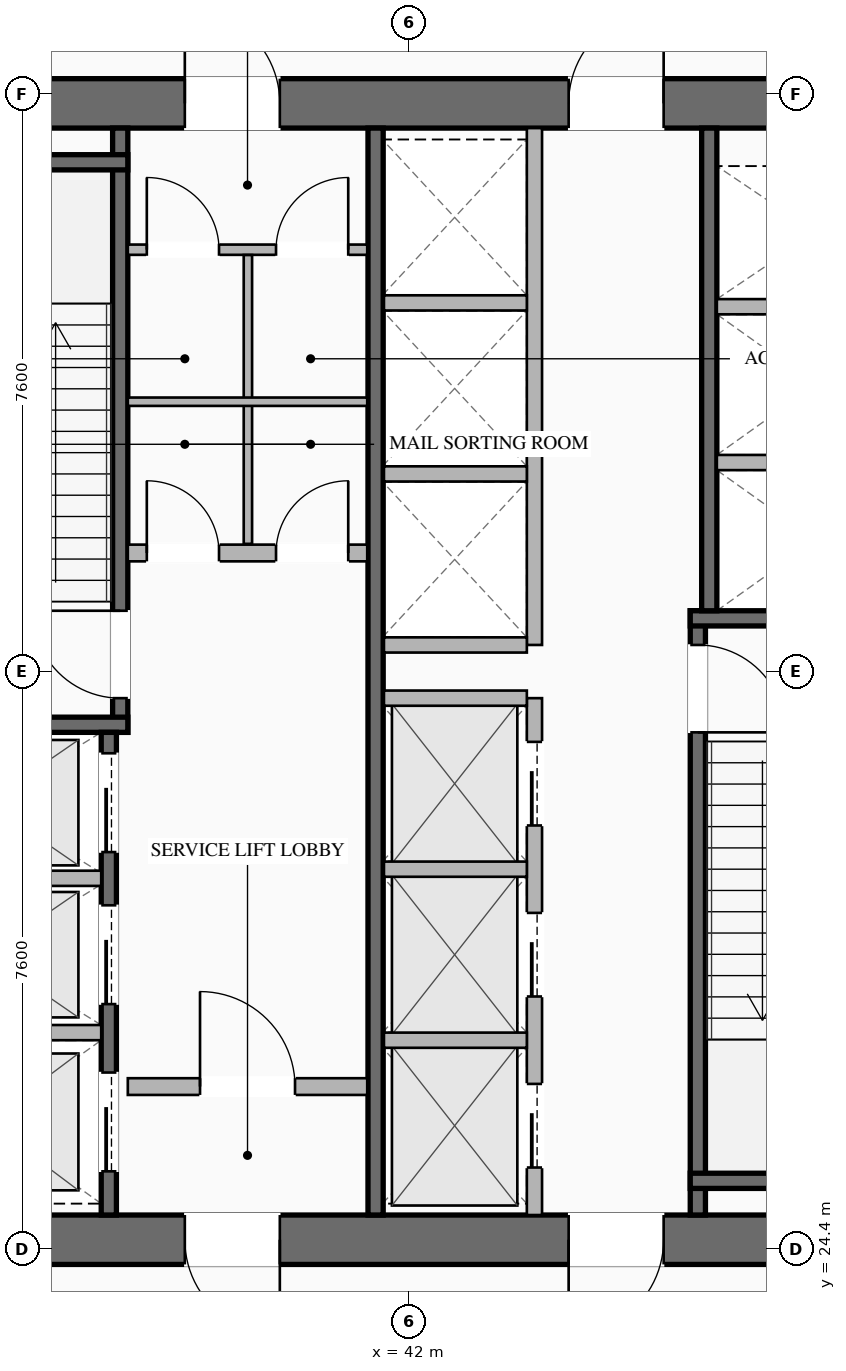
"""IFC4 building model, lengths in metres.
Left out: names, types, materials, properties, quantities, classifications, styles, units other than length and angle.
Written with IfcOpenShell. Run it as: python <this file> out.ifc"""

import sys

from ifc_helpers import new_model, si_unit, direction, frame, frame_2d, origin, place, context, subcontext, project, spatial, rectangle, extrude, element, fill, save


model = new_model("IFC4")
c1 = context("Model", 3, precision=1e-05, world=origin(), true_north=direction((0.0, 1.0)))
c2 = subcontext(c1, "Body", "Model", "MODEL_VIEW")
j1 = project(units=[si_unit("LENGTHUNIT", "METRE"), si_unit("PLANEANGLEUNIT", "RADIAN")], contexts=[c1])
p1 = place(None, origin())
s1 = spatial("IfcSite", under=j1, at=p1, CompositionType="ELEMENT")
p2 = place(p1, origin())
s2 = spatial("IfcBuilding", under=s1, at=p2, CompositionType="ELEMENT")
p3 = place(p2, frame((0.0, 0.0, -5.5)))
s3 = spatial("IfcBuildingStorey", under=s2, at=p3, CompositionType="ELEMENT", Elevation=-5.5)
p4 = place(p3, frame((49.15, 24.525, 0.0), z_axis=(0.0, 0.0, 1.0), x_axis=(-1.0, 0.0, 0.0)))
e1 = element("IfcWall", 1, at=p4, inside=s3, PredefinedType="SHEAR", context=c2, shape_type="SweptSolid", body=[
    extrude(rectangle(XDim=14.3, YDim=0.65, at=frame_2d((7.15, 0.0))), origin(), (0.0, 0.0, 1.0), 5.5),
])
p5 = place(p4, frame((8.85, 0.0, 0.0)))
e2 = element("IfcOpeningElement", 2, at=p5, cuts=e1, PredefinedType="OPENING", context=c2, shape_type="SweptSolid", body=[
    extrude(rectangle(XDim=1.25, YDim=2.25, at=frame_2d((0.625, 1.125))), frame((0.0, 0.335, 0.0), z_axis=(0.0, -1.0, 0.0), x_axis=(1.0, 0.0, 0.0)), (0.0, 0.0, 1.0), 0.67),
])
p6 = place(p4, frame((3.8, 0.0, 0.0)))
e3 = element("IfcOpeningElement", 3, at=p6, cuts=e1, PredefinedType="OPENING", context=c2, shape_type="SweptSolid", body=[
    extrude(rectangle(XDim=1.25, YDim=2.25, at=frame_2d((0.625, 1.125))), frame((0.0, 0.335, 0.0), z_axis=(0.0, -1.0, 0.0), x_axis=(1.0, 0.0, 0.0)), (0.0, 0.0, 1.0), 0.67),
])
p7 = place(p3, frame((34.85, 39.475, 0.0), z_axis=(0.0, 0.0, 1.0), x_axis=(1.0, 0.0, 0.0)))
e4 = element("IfcWall", 4, at=p7, inside=s3, PredefinedType="SHEAR", context=c2, shape_type="SweptSolid", body=[
    extrude(rectangle(XDim=14.3, YDim=0.65, at=frame_2d((7.15, 0.0))), origin(), (0.0, 0.0, 1.0), 5.5),
])
p8 = place(p7, frame((4.2, 0.0, 0.0)))
e5 = element("IfcOpeningElement", 5, at=p8, cuts=e4, PredefinedType="OPENING", context=c2, shape_type="SweptSolid", body=[
    extrude(rectangle(XDim=1.25, YDim=2.25, at=frame_2d((0.625, 1.125))), frame((0.0, 0.335, 0.0), z_axis=(0.0, -1.0, 0.0), x_axis=(1.0, 0.0, 0.0)), (0.0, 0.0, 1.0), 0.67),
])
p9 = place(p7, frame((9.25, 0.0, 0.0)))
e6 = element("IfcOpeningElement", 6, at=p9, cuts=e4, PredefinedType="OPENING", context=c2, shape_type="SweptSolid", body=[
    extrude(rectangle(XDim=1.25, YDim=2.25, at=frame_2d((0.625, 1.125))), frame((0.0, 0.335, 0.0), z_axis=(0.0, -1.0, 0.0), x_axis=(1.0, 0.0, 0.0)), (0.0, 0.0, 1.0), 0.67),
])
p10 = place(p3, frame((38.2, 31.2, 0.0), z_axis=(0.0, 0.0, 1.0), x_axis=(0.0, 1.0, 0.0)))
e7 = element("IfcWall", 7, at=p10, inside=s3, PredefinedType="SHEAR", context=c2, shape_type="SweptSolid", body=[
    extrude(rectangle(XDim=7.95, YDim=0.2, at=frame_2d((3.975, 0.0))), origin(), (0.0, 0.0, 1.0), 5.2),
])
p11 = place(p10, frame((0.45, 0.0, 0.0)))
e8 = element("IfcOpeningElement", 8, at=p11, cuts=e7, PredefinedType="OPENING", context=c2, shape_type="SweptSolid", body=[
    extrude(rectangle(XDim=1.15, YDim=2.2, at=frame_2d((0.575, 1.1))), frame((0.0, 0.11, 0.0), z_axis=(0.0, -1.0, 0.0), x_axis=(1.0, 0.0, 0.0)), (0.0, 0.0, 1.0), 0.22),
])
for number, where, z_axis, x_axis in (
    (9, (34.85, 31.3, 0.0), (0.0, 0.0, 1.0), (1.0, 0.0, 0.0)),
    (10, (34.85, 38.7, 0.0), (0.0, 0.0, 1.0), (1.0, 0.0, 0.0)),
):
    element("IfcWall", number, at=place(p3, frame(where, z_axis=z_axis, x_axis=x_axis)), inside=s3, PredefinedType="SHEAR", context=c2, shape_type="SweptSolid", body=[
        extrude(rectangle(XDim=3.45, YDim=0.2, at=frame_2d((1.725, 0.0))), origin(), (0.0, 0.0, 1.0), 5.2),
    ])
p12 = place(p3, frame((45.8, 32.8, 0.0), z_axis=(0.0, 0.0, 1.0), x_axis=(0.0, -1.0, 0.0)))
e11 = element("IfcWall", 11, at=p12, inside=s3, PredefinedType="SHEAR", context=c2, shape_type="SweptSolid", body=[
    extrude(rectangle(XDim=7.95, YDim=0.2, at=frame_2d((3.975, 0.0))), origin(), (0.0, 0.0, 1.0), 5.2),
])
p13 = place(p12, frame((0.45, 0.0, 0.0)))
e12 = element("IfcOpeningElement", 12, at=p13, cuts=e11, PredefinedType="OPENING", context=c2, shape_type="SweptSolid", body=[
    extrude(rectangle(XDim=1.15, YDim=2.2, at=frame_2d((0.575, 1.1))), frame((0.0, 0.11, 0.0), z_axis=(0.0, -1.0, 0.0), x_axis=(1.0, 0.0, 0.0)), (0.0, 0.0, 1.0), 0.22),
])
for number, where, z_axis, x_axis in (
    (13, (45.7, 32.7, 0.0), (0.0, 0.0, 1.0), (1.0, 0.0, 0.0)),
    (14, (45.7, 25.3, 0.0), (0.0, 0.0, 1.0), (1.0, 0.0, 0.0)),
):
    element("IfcWall", number, at=place(p3, frame(where, z_axis=z_axis, x_axis=x_axis)), inside=s3, PredefinedType="SHEAR", context=c2, shape_type="SweptSolid", body=[
        extrude(rectangle(XDim=3.45, YDim=0.2, at=frame_2d((1.725, 0.0))), origin(), (0.0, 0.0, 1.0), 5.2),
    ])
p14 = place(p3, frame((41.56, 24.85, 0.0), z_axis=(0.0, 0.0, 1.0), x_axis=(0.0, 1.0, 0.0)))
e15 = element("IfcWall", 15, at=p14, inside=s3, PredefinedType="SHEAR", context=c2, shape_type="SweptSolid", body=[
    extrude(rectangle(XDim=14.3, YDim=0.2, at=frame_2d((7.15, 0.0))), origin(), (0.0, 0.0, 1.0), 5.2),
])
p15 = place(p3, frame((38.3, 33.56, 0.0), z_axis=(0.0, 0.0, 1.0), x_axis=(1.0, 0.0, 0.0)))
e16 = element("IfcWall", 16, at=p15, inside=s3, PredefinedType="SOLIDWALL", context=c2, shape_type="SweptSolid", body=[
    extrude(rectangle(XDim=3.15, YDim=0.22, at=frame_2d((1.575, 0.0))), origin(), (0.0, 0.0, 1.0), 4.243),
])
p16 = place(p15, frame((0.25, 0.0, 0.0)))
e17 = element("IfcOpeningElement", 17, at=p16, cuts=e16, PredefinedType="OPENING", context=c2, shape_type="SweptSolid", body=[
    extrude(rectangle(XDim=0.95, YDim=2.05, at=frame_2d((0.475, 1.025))), frame((0.0, 0.12, 0.0), z_axis=(0.0, -1.0, 0.0), x_axis=(1.0, 0.0, 0.0)), (0.0, 0.0, 1.0), 0.24),
])
p17 = place(p15, frame((1.95, 0.0, 0.0)))
e18 = element("IfcOpeningElement", 18, at=p17, cuts=e16, PredefinedType="OPENING", context=c2, shape_type="SweptSolid", body=[
    extrude(rectangle(XDim=0.95, YDim=2.05, at=frame_2d((0.475, 1.025))), frame((0.0, 0.12, 0.0), z_axis=(0.0, -1.0, 0.0), x_axis=(1.0, 0.0, 0.0)), (0.0, 0.0, 1.0), 0.24),
])
p18 = place(p3, frame((38.3, 26.54, 0.0), z_axis=(0.0, 0.0, 1.0), x_axis=(1.0, 0.0, 0.0)))
e19 = element("IfcWall", 19, at=p18, inside=s3, PredefinedType="SOLIDWALL", context=c2, shape_type="SweptSolid", body=[
    extrude(rectangle(XDim=3.15, YDim=0.22, at=frame_2d((1.575, 0.0))), origin(), (0.0, 0.0, 1.0), 4.243),
])
p19 = place(p18, frame((0.95, 0.0, 0.0)))
e20 = element("IfcOpeningElement", 20, at=p19, cuts=e19, PredefinedType="OPENING", context=c2, shape_type="SweptSolid", body=[
    extrude(rectangle(XDim=1.25, YDim=2.25, at=frame_2d((0.625, 1.125))), frame((0.0, 0.12, 0.0), z_axis=(0.0, -1.0, 0.0), x_axis=(1.0, 0.0, 0.0)), (0.0, 0.0, 1.0), 0.24),
])
p20 = place(p3, frame((38.05, 24.85, 0.0), z_axis=(0.0, 0.0, 1.0), x_axis=(0.0, 1.0, 0.0)))
e21 = element("IfcWall", 21, at=p20, inside=s3, PredefinedType="SHEAR", context=c2, shape_type="SweptSolid", body=[
    extrude(rectangle(XDim=6.35, YDim=0.2, at=frame_2d((3.175, 0.0))), origin(), (0.0, 0.0, 1.0), 5.2),
])
p21 = place(p20, frame((4.775, 0.0, 0.0)))
e22 = element("IfcOpeningElement", 22, at=p21, cuts=e21, PredefinedType="OPENING", context=c2, shape_type="SweptSolid", body=[
    extrude(rectangle(XDim=1.3, YDim=2.25, at=frame_2d((0.65, 1.125))), frame((0.0, 0.11, 0.0), z_axis=(0.0, -1.0, 0.0), x_axis=(1.0, 0.0, 0.0)), (0.0, 0.0, 1.0), 0.22),
])
p22 = place(p20, frame((2.775, 0.0, 0.0)))
e23 = element("IfcOpeningElement", 23, at=p22, cuts=e21, PredefinedType="OPENING", context=c2, shape_type="SweptSolid", body=[
    extrude(rectangle(XDim=1.3, YDim=2.25, at=frame_2d((0.65, 1.125))), frame((0.0, 0.11, 0.0), z_axis=(0.0, -1.0, 0.0), x_axis=(1.0, 0.0, 0.0)), (0.0, 0.0, 1.0), 0.22),
])
p23 = place(p20, frame((0.575, 0.0, 0.0)))
e24 = element("IfcOpeningElement", 24, at=p23, cuts=e21, PredefinedType="OPENING", context=c2, shape_type="SweptSolid", body=[
    extrude(rectangle(XDim=1.3, YDim=2.25, at=frame_2d((0.65, 1.125))), frame((0.0, 0.11, 0.0), z_axis=(0.0, -1.0, 0.0), x_axis=(1.0, 0.0, 0.0)), (0.0, 0.0, 1.0), 0.22),
])
for number, where, z_axis, x_axis in (
    (25, (34.85, 27.25, 0.0), (0.0, 0.0, 1.0), (1.0, 0.0, 0.0)),
    (26, (34.85, 29.28, 0.0), (0.0, 0.0, 1.0), (1.0, 0.0, 0.0)),
):
    element("IfcWall", number, at=place(p3, frame(where, z_axis=z_axis, x_axis=x_axis)), inside=s3, PredefinedType="SOLIDWALL", context=c2, shape_type="SweptSolid", body=[
        extrude(rectangle(XDim=3.1, YDim=0.2, at=frame_2d((1.55, 0.0))), origin(), (0.0, 0.0, 1.0), 5.2),
    ])
p24 = place(p3, frame((45.95, 39.15, 0.0), z_axis=(0.0, 0.0, 1.0), x_axis=(0.0, -1.0, 0.0)))
e27 = element("IfcWall", 27, at=p24, inside=s3, PredefinedType="SHEAR", context=c2, shape_type="SweptSolid", body=[
    extrude(rectangle(XDim=6.35, YDim=0.2, at=frame_2d((3.175, 0.0))), origin(), (0.0, 0.0, 1.0), 5.2),
])
for number, where, z_axis, x_axis in (
    (28, (46.05, 34.75, 0.0), (0.0, 0.0, 1.0), (1.0, 0.0, 0.0)),
    (29, (46.05, 36.8, 0.0), (0.0, 0.0, 1.0), (1.0, 0.0, 0.0)),
):
    element("IfcWall", number, at=place(p3, frame(where, z_axis=z_axis, x_axis=x_axis)), inside=s3, PredefinedType="SOLIDWALL", context=c2, shape_type="SweptSolid", body=[
        extrude(rectangle(XDim=3.1, YDim=0.2, at=frame_2d((1.55, 0.0))), origin(), (0.0, 0.0, 1.0), 5.2),
    ])
p25 = place(p3, frame((38.3, 37.55, 0.0), z_axis=(0.0, 0.0, 1.0), x_axis=(1.0, 0.0, 0.0)))
e30 = element("IfcWall", 30, at=p25, inside=s3, PredefinedType="PARTITIONING", context=c2, shape_type="SweptSolid", body=[
    extrude(rectangle(XDim=3.15, YDim=0.135, at=frame_2d((1.575, 0.0))), origin(), (0.0, 0.0, 1.0), 4.243),
])
p26 = place(p25, frame((0.25, 0.0, 0.0)))
e31 = element("IfcOpeningElement", 31, at=p26, cuts=e30, PredefinedType="OPENING", context=c2, shape_type="SweptSolid", body=[
    extrude(rectangle(XDim=0.95, YDim=2.05, at=frame_2d((0.475, 1.025))), frame((0.0, 0.077, 0.0), z_axis=(0.0, -1.0, 0.0), x_axis=(1.0, 0.0, 0.0)), (0.0, 0.0, 1.0), 0.155),
])
p27 = place(p25, frame((1.95, 0.0, 0.0)))
e32 = element("IfcOpeningElement", 32, at=p27, cuts=e30, PredefinedType="OPENING", context=c2, shape_type="SweptSolid", body=[
    extrude(rectangle(XDim=0.95, YDim=2.05, at=frame_2d((0.475, 1.025))), frame((0.0, 0.077, 0.0), z_axis=(0.0, -1.0, 0.0), x_axis=(1.0, 0.0, 0.0)), (0.0, 0.0, 1.0), 0.155),
])
p28 = place(p3, frame((39.88, 33.68, 0.0), z_axis=(0.0, 0.0, 1.0), x_axis=(0.0, 1.0, 0.0)))
e33 = element("IfcWall", 33, at=p28, inside=s3, PredefinedType="PARTITIONING", context=c2, shape_type="SweptSolid", body=[
    extrude(rectangle(XDim=3.8, YDim=0.11, at=frame_2d((1.9, 0.0))), origin(), (0.0, 0.0, 1.0), 4.243),
])
p29 = place(p3, frame((38.3, 35.55, 0.0), z_axis=(0.0, 0.0, 1.0), x_axis=(1.0, 0.0, 0.0)))
e34 = element("IfcWall", 34, at=p29, inside=s3, PredefinedType="PARTITIONING", context=c2, shape_type="SweptSolid", body=[
    extrude(rectangle(XDim=3.15, YDim=0.11, at=frame_2d((1.575, 0.0))), origin(), (0.0, 0.0, 1.0), 4.243),
])
p30 = place(p3, frame((43.65, 24.85, 0.0), z_axis=(0.0, 0.0, 1.0), x_axis=(0.0, 1.0, 0.0)))
e35 = element("IfcWall", 35, at=p30, inside=s3, PredefinedType="SOLIDWALL", context=c2, shape_type="SweptSolid", body=[
    extrude(rectangle(XDim=6.8, YDim=0.2, at=frame_2d((3.4, 0.0))), origin(), (0.0, 0.0, 1.0), 5.2),
])
p31 = place(p30, frame((0.625, 0.0, 0.0)))
e36 = element("IfcOpeningElement", 36, at=p31, cuts=e35, PredefinedType="OPENING", context=c2, shape_type="SweptSolid", body=[
    extrude(rectangle(XDim=1.1, YDim=2.2, at=frame_2d((0.55, 1.1))), frame((0.0, 0.11, 0.0), z_axis=(0.0, -1.0, 0.0), x_axis=(1.0, 0.0, 0.0)), (0.0, 0.0, 1.0), 0.22),
])
p32 = place(p30, frame((2.875, 0.0, 0.0)))
e37 = element("IfcOpeningElement", 37, at=p32, cuts=e35, PredefinedType="OPENING", context=c2, shape_type="SweptSolid", body=[
    extrude(rectangle(XDim=1.1, YDim=2.2, at=frame_2d((0.55, 1.1))), frame((0.0, 0.11, 0.0), z_axis=(0.0, -1.0, 0.0), x_axis=(1.0, 0.0, 0.0)), (0.0, 0.0, 1.0), 0.22),
])
p33 = place(p30, frame((5.125, 0.0, 0.0)))
e38 = element("IfcOpeningElement", 38, at=p33, cuts=e35, PredefinedType="OPENING", context=c2, shape_type="SweptSolid", body=[
    extrude(rectangle(XDim=1.1, YDim=2.2, at=frame_2d((0.55, 1.1))), frame((0.0, 0.11, 0.0), z_axis=(0.0, -1.0, 0.0), x_axis=(1.0, 0.0, 0.0)), (0.0, 0.0, 1.0), 0.22),
])
for number, where, z_axis, x_axis in (
    (39, (41.67, 27.15, 0.0), (0.0, 0.0, 1.0), (1.0, 0.0, 0.0)),
    (40, (41.67, 29.4, 0.0), (0.0, 0.0, 1.0), (1.0, 0.0, 0.0)),
    (41, (41.67, 31.65, 0.0), (0.0, 0.0, 1.0), (1.0, 0.0, 0.0)),
):
    element("IfcWall", number, at=place(p3, frame(where, z_axis=z_axis, x_axis=x_axis)), inside=s3, PredefinedType="SOLIDWALL", context=c2, shape_type="SweptSolid", body=[
        extrude(rectangle(XDim=1.88, YDim=0.2, at=frame_2d((0.94, 0.0))), origin(), (0.0, 0.0, 1.0), 5.2),
    ])
p34 = place(p3, frame((43.65, 32.35, 0.0), z_axis=(0.0, 0.0, 1.0), x_axis=(0.0, 1.0, 0.0)))
e42 = element("IfcWall", 42, at=p34, inside=s3, PredefinedType="SOLIDWALL", context=c2, shape_type="SweptSolid", body=[
    extrude(rectangle(XDim=6.8, YDim=0.2, at=frame_2d((3.4, 0.0))), origin(), (0.0, 0.0, 1.0), 5.2),
])
for number, where, z_axis, x_axis in (
    (43, (41.67, 32.35, 0.0), (0.0, 0.0, 1.0), (1.0, 0.0, 0.0)),
    (44, (41.67, 34.6, 0.0), (0.0, 0.0, 1.0), (1.0, 0.0, 0.0)),
    (45, (41.67, 36.85, 0.0), (0.0, 0.0, 1.0), (1.0, 0.0, 0.0)),
):
    element("IfcWall", number, at=place(p3, frame(where, z_axis=z_axis, x_axis=x_axis)), inside=s3, PredefinedType="SOLIDWALL", context=c2, shape_type="SweptSolid", body=[
        extrude(rectangle(XDim=1.88, YDim=0.2, at=frame_2d((0.94, 0.0))), origin(), (0.0, 0.0, 1.0), 5.2),
    ])
p35 = place(p8, origin())
e46 = element("IfcDoor", 46, at=p35, inside=s3, OperationType="SINGLE_SWING_LEFT", PredefinedType="DOOR", context=c2, shape_type="SweptSolid", body=[
    extrude(rectangle(XDim=1.25, YDim=2.25, at=frame_2d((0.625, 1.125))), frame((0.0, 0.025, 0.0), z_axis=(0.0, -1.0, 0.0), x_axis=(1.0, 0.0, 0.0)), (0.0, 0.0, 1.0), 0.05),
])
fill(e5, e46)
p36 = place(p9, origin())
e47 = element("IfcDoor", 47, at=p36, inside=s3, OperationType="SINGLE_SWING_RIGHT", PredefinedType="DOOR", context=c2, shape_type="SweptSolid", body=[
    extrude(rectangle(XDim=1.25, YDim=2.25, at=frame_2d((0.625, 1.125))), frame((0.0, 0.025, 0.0), z_axis=(0.0, -1.0, 0.0), x_axis=(1.0, 0.0, 0.0)), (0.0, 0.0, 1.0), 0.05),
])
fill(e6, e47)
p37 = place(p5, origin())
e48 = element("IfcDoor", 48, at=p37, inside=s3, OperationType="SINGLE_SWING_LEFT", PredefinedType="DOOR", context=c2, shape_type="SweptSolid", body=[
    extrude(rectangle(XDim=1.25, YDim=2.25, at=frame_2d((0.625, 1.125))), frame((0.0, 0.025, 0.0), z_axis=(0.0, -1.0, 0.0), x_axis=(1.0, 0.0, 0.0)), (0.0, 0.0, 1.0), 0.05),
])
fill(e2, e48)
p38 = place(p6, origin())
e49 = element("IfcDoor", 49, at=p38, inside=s3, OperationType="SINGLE_SWING_RIGHT", PredefinedType="DOOR", context=c2, shape_type="SweptSolid", body=[
    extrude(rectangle(XDim=1.25, YDim=2.25, at=frame_2d((0.625, 1.125))), frame((0.0, 0.025, 0.0), z_axis=(0.0, -1.0, 0.0), x_axis=(1.0, 0.0, 0.0)), (0.0, 0.0, 1.0), 0.05),
])
fill(e3, e49)
p39 = place(p11, origin())
e50 = element("IfcDoor", 50, at=p39, inside=s3, OperationType="SINGLE_SWING_RIGHT", PredefinedType="DOOR", context=c2, shape_type="SweptSolid", body=[
    extrude(rectangle(XDim=1.15, YDim=2.2, at=frame_2d((0.575, 1.1))), frame((0.0, 0.025, 0.0), z_axis=(0.0, -1.0, 0.0), x_axis=(1.0, 0.0, 0.0)), (0.0, 0.0, 1.0), 0.05),
])
fill(e8, e50)
p40 = place(p13, origin())
e51 = element("IfcDoor", 51, at=p40, inside=s3, OperationType="SINGLE_SWING_RIGHT", PredefinedType="DOOR", context=c2, shape_type="SweptSolid", body=[
    extrude(rectangle(XDim=1.15, YDim=2.2, at=frame_2d((0.575, 1.1))), frame((0.0, 0.025, 0.0), z_axis=(0.0, -1.0, 0.0), x_axis=(1.0, 0.0, 0.0)), (0.0, 0.0, 1.0), 0.05),
])
fill(e12, e51)
p41 = place(p19, origin())
e52 = element("IfcDoor", 52, at=p41, inside=s3, OperationType="SINGLE_SWING_LEFT", PredefinedType="DOOR", context=c2, shape_type="SweptSolid", body=[
    extrude(rectangle(XDim=1.25, YDim=2.25, at=frame_2d((0.625, 1.125))), frame((0.0, 0.025, 0.0), z_axis=(0.0, -1.0, 0.0), x_axis=(1.0, 0.0, 0.0)), (0.0, 0.0, 1.0), 0.05),
])
fill(e20, e52)
p42 = place(p26, origin())
e53 = element("IfcDoor", 53, at=p42, inside=s3, OperationType="SINGLE_SWING_LEFT", PredefinedType="DOOR", context=c2, shape_type="SweptSolid", body=[
    extrude(rectangle(XDim=0.95, YDim=2.05, at=frame_2d((0.475, 1.025))), frame((0.0, 0.025, 0.0), z_axis=(0.0, -1.0, 0.0), x_axis=(1.0, 0.0, 0.0)), (0.0, 0.0, 1.0), 0.05),
])
fill(e31, e53)
p43 = place(p27, origin())
e54 = element("IfcDoor", 54, at=p43, inside=s3, OperationType="SINGLE_SWING_RIGHT", PredefinedType="DOOR", context=c2, shape_type="SweptSolid", body=[
    extrude(rectangle(XDim=0.95, YDim=2.05, at=frame_2d((0.475, 1.025))), frame((0.0, 0.025, 0.0), z_axis=(0.0, -1.0, 0.0), x_axis=(1.0, 0.0, 0.0)), (0.0, 0.0, 1.0), 0.05),
])
fill(e32, e54)
p44 = place(p16, origin())
e55 = element("IfcDoor", 55, at=p44, inside=s3, OperationType="SINGLE_SWING_LEFT", PredefinedType="DOOR", context=c2, shape_type="SweptSolid", body=[
    extrude(rectangle(XDim=0.95, YDim=2.05, at=frame_2d((0.475, 1.025))), frame((0.0, 0.025, 0.0), z_axis=(0.0, -1.0, 0.0), x_axis=(1.0, 0.0, 0.0)), (0.0, 0.0, 1.0), 0.05),
])
fill(e17, e55)
p45 = place(p17, origin())
e56 = element("IfcDoor", 56, at=p45, inside=s3, OperationType="SINGLE_SWING_RIGHT", PredefinedType="DOOR", context=c2, shape_type="SweptSolid", body=[
    extrude(rectangle(XDim=0.95, YDim=2.05, at=frame_2d((0.475, 1.025))), frame((0.0, 0.025, 0.0), z_axis=(0.0, -1.0, 0.0), x_axis=(1.0, 0.0, 0.0)), (0.0, 0.0, 1.0), 0.05),
])
fill(e18, e56)
p46 = place(p21, origin())
e57 = element("IfcDoor", 57, at=p46, inside=s3, OperationType="SLIDING_TO_LEFT", PredefinedType="DOOR", context=c2, shape_type="SweptSolid", body=[
    extrude(rectangle(XDim=1.3, YDim=2.25, at=frame_2d((0.65, 1.125))), frame((0.0, 0.025, 0.0), z_axis=(0.0, -1.0, 0.0), x_axis=(1.0, 0.0, 0.0)), (0.0, 0.0, 1.0), 0.05),
])
fill(e22, e57)
p47 = place(p22, origin())
e58 = element("IfcDoor", 58, at=p47, inside=s3, OperationType="SLIDING_TO_LEFT", PredefinedType="DOOR", context=c2, shape_type="SweptSolid", body=[
    extrude(rectangle(XDim=1.3, YDim=2.25, at=frame_2d((0.65, 1.125))), frame((0.0, 0.025, 0.0), z_axis=(0.0, -1.0, 0.0), x_axis=(1.0, 0.0, 0.0)), (0.0, 0.0, 1.0), 0.05),
])
fill(e23, e58)
p48 = place(p23, origin())
e59 = element("IfcDoor", 59, at=p48, inside=s3, OperationType="SLIDING_TO_LEFT", PredefinedType="DOOR", context=c2, shape_type="SweptSolid", body=[
    extrude(rectangle(XDim=1.3, YDim=2.25, at=frame_2d((0.65, 1.125))), frame((0.0, 0.025, 0.0), z_axis=(0.0, -1.0, 0.0), x_axis=(1.0, 0.0, 0.0)), (0.0, 0.0, 1.0), 0.05),
])
fill(e24, e59)
p49 = place(p31, origin())
e60 = element("IfcDoor", 60, at=p49, inside=s3, OperationType="SLIDING_TO_LEFT", PredefinedType="DOOR", context=c2, shape_type="SweptSolid", body=[
    extrude(rectangle(XDim=1.1, YDim=2.2, at=frame_2d((0.55, 1.1))), frame((0.0, 0.025, 0.0), z_axis=(0.0, -1.0, 0.0), x_axis=(1.0, 0.0, 0.0)), (0.0, 0.0, 1.0), 0.05),
])
fill(e36, e60)
p50 = place(p32, origin())
e61 = element("IfcDoor", 61, at=p50, inside=s3, OperationType="SLIDING_TO_LEFT", PredefinedType="DOOR", context=c2, shape_type="SweptSolid", body=[
    extrude(rectangle(XDim=1.1, YDim=2.2, at=frame_2d((0.55, 1.1))), frame((0.0, 0.025, 0.0), z_axis=(0.0, -1.0, 0.0), x_axis=(1.0, 0.0, 0.0)), (0.0, 0.0, 1.0), 0.05),
])
fill(e37, e61)
p51 = place(p33, origin())
e62 = element("IfcDoor", 62, at=p51, inside=s3, OperationType="SLIDING_TO_LEFT", PredefinedType="DOOR", context=c2, shape_type="SweptSolid", body=[
    extrude(rectangle(XDim=1.1, YDim=2.2, at=frame_2d((0.55, 1.1))), frame((0.0, 0.025, 0.0), z_axis=(0.0, -1.0, 0.0), x_axis=(1.0, 0.0, 0.0)), (0.0, 0.0, 1.0), 0.05),
])
fill(e38, e62)
save(model, sys.argv[1])
